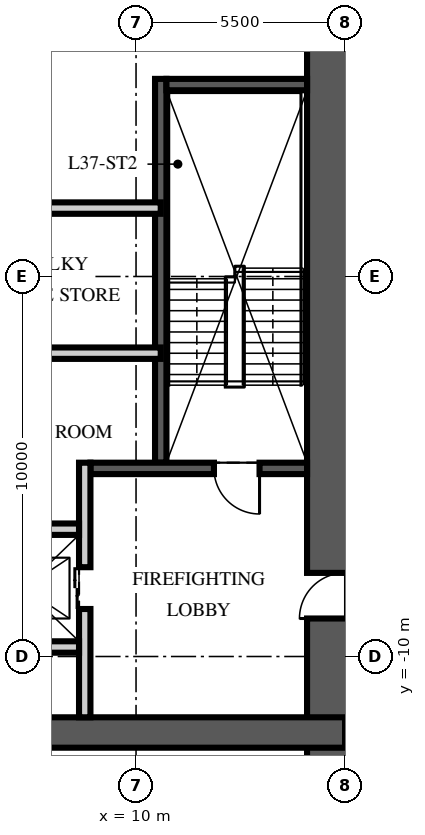
"""IFC4 building model, lengths in metres.
Left out: names, types, materials, properties, quantities, classifications, styles, units other than length and angle.
Written with IfcOpenShell. Run it as: python <this file> out.ifc"""

import sys

from ifc_helpers import new_model, si_unit, direction, frame, frame_2d, origin, place, context, subcontext, project, spatial, rectangle, extrude, element, fill, save


model = new_model("IFC4")
c1 = context("Model", 3, precision=1e-05, world=origin(), true_north=direction((0.0, 1.0)))
c2 = subcontext(c1, "Body", "Model", "MODEL_VIEW")
j1 = project(units=[si_unit("LENGTHUNIT", "METRE"), si_unit("PLANEANGLEUNIT", "RADIAN")], contexts=[c1])
p1 = place(None, origin())
s1 = spatial("IfcSite", under=j1, at=p1, CompositionType="ELEMENT")
p2 = place(p1, origin())
s2 = spatial("IfcBuilding", under=s1, at=p2, CompositionType="ELEMENT")
p3 = place(p2, frame((0.0, 0.0, 148.5)))
s3 = spatial("IfcBuildingStorey", under=s2, at=p3, CompositionType="ELEMENT", Elevation=148.5)
p4 = place(p3, frame((15.5, -15.5, -0.25), z_axis=(0.0, 0.0, 1.0), x_axis=(0.0, 1.0, 0.0)))
e1 = element("IfcWall", 1, at=p4, inside=s3, PredefinedType="SHEAR", context=c2, shape_type="SweptSolid", body=[
    extrude(rectangle(XDim=31.0, YDim=2.0, at=frame_2d((15.5, 0.0))), origin(), (0.0, 0.0, 1.0), 3.75),
])
p5 = place(p4, frame((6.5, 0.0, 0.25)))
e2 = element("IfcOpeningElement", 2, at=p5, cuts=e1, PredefinedType="OPENING", context=c2, shape_type="SweptSolid", body=[
    extrude(rectangle(XDim=1.2, YDim=2.1, at=frame_2d((0.6, 1.05))), frame((0.0, 1.01, 0.0), z_axis=(0.0, -1.0, 0.0), x_axis=(1.0, 0.0, 0.0)), (0.0, 0.0, 1.0), 2.02),
])
p6 = place(p4, frame((23.0, 0.0, 0.25)))
e3 = element("IfcOpeningElement", 3, at=p6, cuts=e1, PredefinedType="OPENING", context=c2, shape_type="SweptSolid", body=[
    extrude(rectangle(XDim=1.8, YDim=2.1, at=frame_2d((0.9, 1.05))), frame((0.0, 1.01, 0.0), z_axis=(0.0, -1.0, 0.0), x_axis=(1.0, 0.0, 0.0)), (0.0, 0.0, 1.0), 2.02),
])
p7 = place(p3, frame((-15.5, -12.0, -0.25), z_axis=(0.0, 0.0, 1.0), x_axis=(1.0, 0.0, 0.0)))
e4 = element("IfcWall", 4, at=p7, inside=s3, PredefinedType="SHEAR", context=c2, shape_type="SweptSolid", body=[
    extrude(rectangle(XDim=31.0, YDim=0.8, at=frame_2d((15.5, 0.0))), origin(), (0.0, 0.0, 1.0), 3.75),
])
p8 = place(p3, frame((10.65, -4.9, 0.0), z_axis=(0.0, 0.0, 1.0), x_axis=(0.0, 1.0, 0.0)))
e5 = element("IfcWall", 5, at=p8, inside=s3, PredefinedType="SOLIDWALL", context=c2, shape_type="SweptSolid", body=[
    extrude(rectangle(XDim=10.1, YDim=0.3, at=frame_2d((5.05, 0.0))), origin(), (0.0, 0.0, 1.0), 3.5),
])
p9 = place(p3, frame((14.5, -5.05, 0.0), z_axis=(0.0, 0.0, 1.0), x_axis=(-1.0, 0.0, 0.0)))
e6 = element("IfcWall", 6, at=p9, inside=s3, PredefinedType="SOLIDWALL", context=c2, shape_type="SweptSolid", body=[
    extrude(rectangle(XDim=5.7, YDim=0.3, at=frame_2d((2.85, 0.0))), origin(), (0.0, 0.0, 1.0), 3.5),
])
p10 = place(p9, frame((1.25, 0.0, 0.0)))
e7 = element("IfcOpeningElement", 7, at=p10, cuts=e6, PredefinedType="OPENING", context=c2, shape_type="SweptSolid", body=[
    extrude(rectangle(XDim=1.2, YDim=2.1, at=frame_2d((0.6, 1.05))), frame((0.0, 0.16, 0.0), z_axis=(0.0, -1.0, 0.0), x_axis=(1.0, 0.0, 0.0)), (0.0, 0.0, 1.0), 0.32),
])
p11 = place(p3, frame((14.5, 5.05, 0.0), z_axis=(0.0, 0.0, 1.0), x_axis=(-1.0, 0.0, 0.0)))
e8 = element("IfcWall", 8, at=p11, inside=s3, PredefinedType="SOLIDWALL", context=c2, shape_type="SweptSolid", body=[
    extrude(rectangle(XDim=3.7, YDim=0.3, at=frame_2d((1.85, 0.0))), origin(), (0.0, 0.0, 1.0), 3.5),
])
p12 = place(p3, frame((8.65, -11.6, 0.0), z_axis=(0.0, 0.0, 1.0), x_axis=(0.0, 1.0, 0.0)))
e9 = element("IfcWall", 9, at=p12, inside=s3, PredefinedType="PARTITIONING", context=c2, shape_type="SweptSolid", body=[
    extrude(rectangle(XDim=6.7, YDim=0.3, at=frame_2d((3.35, 0.0))), origin(), (0.0, 0.0, 1.0), 3.5),
])
p13 = place(p12, frame((2.85, 0.0, 0.0)))
e10 = element("IfcOpeningElement", 10, at=p13, cuts=e9, PredefinedType="OPENING", context=c2, shape_type="SweptSolid", body=[
    extrude(rectangle(XDim=1.1, YDim=2.1, at=frame_2d((0.55, 1.05))), frame((0.0, 0.16, 0.0), z_axis=(0.0, -1.0, 0.0), x_axis=(1.0, 0.0, 0.0)), (0.0, 0.0, 1.0), 0.32),
])
p14 = place(p3, frame((-8.5, -6.65, 0.0), z_axis=(0.0, 0.0, 1.0), x_axis=(1.0, 0.0, 0.0)))
e11 = element("IfcWall", 11, at=p14, inside=s3, PredefinedType="PARTITIONING", context=c2, shape_type="SweptSolid", body=[
    extrude(rectangle(XDim=17.0, YDim=0.3, at=frame_2d((8.5, 0.0))), origin(), (0.0, 0.0, 1.0), 3.5),
])
p15 = place(p14, frame((7.8, 0.0, 0.0)))
e12 = element("IfcOpeningElement", 12, at=p15, cuts=e11, PredefinedType="OPENING", context=c2, shape_type="SweptSolid", body=[
    extrude(rectangle(XDim=1.3, YDim=2.4, at=frame_2d((0.65, 1.2))), frame((0.0, 0.16, 0.0), z_axis=(0.0, -1.0, 0.0), x_axis=(1.0, 0.0, 0.0)), (0.0, 0.0, 1.0), 0.32),
])
p16 = place(p14, frame((5.65, 0.0, 0.0)))
e13 = element("IfcOpeningElement", 13, at=p16, cuts=e11, PredefinedType="OPENING", context=c2, shape_type="SweptSolid", body=[
    extrude(rectangle(XDim=0.9, YDim=2.1, at=frame_2d((0.45, 1.05))), frame((0.0, 0.16, 0.0), z_axis=(0.0, -1.0, 0.0), x_axis=(1.0, 0.0, 0.0)), (0.0, 0.0, 1.0), 0.32),
])
p17 = place(p14, frame((10.4, 0.0, 0.0)))
e14 = element("IfcOpeningElement", 14, at=p17, cuts=e11, PredefinedType="OPENING", context=c2, shape_type="SweptSolid", body=[
    extrude(rectangle(XDim=0.9, YDim=2.1, at=frame_2d((0.45, 1.05))), frame((0.0, 0.16, 0.0), z_axis=(0.0, -1.0, 0.0), x_axis=(1.0, 0.0, 0.0)), (0.0, 0.0, 1.0), 0.32),
])
p18 = place(p3, frame((5.6, -9.75, 0.0), z_axis=(0.0, 0.0, 1.0), x_axis=(1.0, 0.0, 0.0)))
e15 = element("IfcWall", 15, at=p18, inside=s3, PredefinedType="PARTITIONING", context=c2, shape_type="SweptSolid", body=[
    extrude(rectangle(XDim=2.9, YDim=0.3, at=frame_2d((1.45, 0.0))), origin(), (0.0, 0.0, 1.0), 3.5),
])
p19 = place(p3, frame((-10.65, 1.8, 0.0), z_axis=(0.0, 0.0, 1.0), x_axis=(1.0, 0.0, 0.0)))
e16 = element("IfcWall", 16, at=p19, inside=s3, PredefinedType="PARTITIONING", context=c2, shape_type="SweptSolid", body=[
    extrude(rectangle(XDim=21.3, YDim=0.3, at=frame_2d((10.65, 0.0))), origin(), (0.0, 0.0, 1.0), 3.5),
])
p20 = place(p19, frame((10.05, 0.0, 0.0)))
e17 = element("IfcOpeningElement", 17, at=p20, cuts=e16, PredefinedType="OPENING", context=c2, shape_type="SweptSolid", body=[
    extrude(rectangle(XDim=1.2, YDim=2.1, at=frame_2d((0.6, 1.05))), frame((0.0, 0.16, 0.0), z_axis=(0.0, -1.0, 0.0), x_axis=(1.0, 0.0, 0.0)), (0.0, 0.0, 1.0), 0.32),
])
p21 = place(p19, frame((0.938, 0.0, 0.0)))
e18 = element("IfcOpeningElement", 18, at=p21, cuts=e16, PredefinedType="OPENING", context=c2, shape_type="SweptSolid", body=[
    extrude(rectangle(XDim=0.9, YDim=2.1, at=frame_2d((0.45, 1.05))), frame((0.0, 0.16, 0.0), z_axis=(0.0, -1.0, 0.0), x_axis=(1.0, 0.0, 0.0)), (0.0, 0.0, 1.0), 0.32),
])
p22 = place(p3, frame((10.65, -2.018, 0.0), z_axis=(0.0, 0.0, 1.0), x_axis=(-1.0, 0.0, 0.0)))
e19 = element("IfcWall", 19, at=p22, inside=s3, PredefinedType="PARTITIONING", context=c2, shape_type="SweptSolid", body=[
    extrude(rectangle(XDim=5.55, YDim=0.3, at=frame_2d((2.775, 0.0))), origin(), (0.0, 0.0, 1.0), 3.5),
])
p23 = place(p10, origin())
e20 = element("IfcDoor", 20, at=p23, inside=s3, OperationType="SINGLE_SWING_LEFT", PredefinedType="DOOR", context=c2, shape_type="SweptSolid", body=[
    extrude(rectangle(XDim=1.2, YDim=2.1, at=frame_2d((0.6, 1.05))), frame((0.0, 0.025, 0.0), z_axis=(0.0, -1.0, 0.0), x_axis=(1.0, 0.0, 0.0)), (0.0, 0.0, 1.0), 0.05),
])
fill(e7, e20)
p24 = place(p5, origin())
e21 = element("IfcDoor", 21, at=p24, inside=s3, OperationType="SINGLE_SWING_LEFT", PredefinedType="DOOR", context=c2, shape_type="SweptSolid", body=[
    extrude(rectangle(XDim=1.2, YDim=2.1, at=frame_2d((0.6, 1.05))), frame((0.0, 0.025, 0.0), z_axis=(0.0, -1.0, 0.0), x_axis=(1.0, 0.0, 0.0)), (0.0, 0.0, 1.0), 0.05),
])
fill(e2, e21)
p25 = place(p13, origin())
e22 = element("IfcDoor", 22, at=p25, inside=s3, OperationType="DOUBLE_DOOR_SLIDING", PredefinedType="DOOR", context=c2, shape_type="SweptSolid", body=[
    extrude(rectangle(XDim=1.1, YDim=2.1, at=frame_2d((0.55, 1.05))), frame((0.0, 0.025, 0.0), z_axis=(0.0, -1.0, 0.0), x_axis=(1.0, 0.0, 0.0)), (0.0, 0.0, 1.0), 0.05),
])
fill(e10, e22)
save(model, sys.argv[1])
